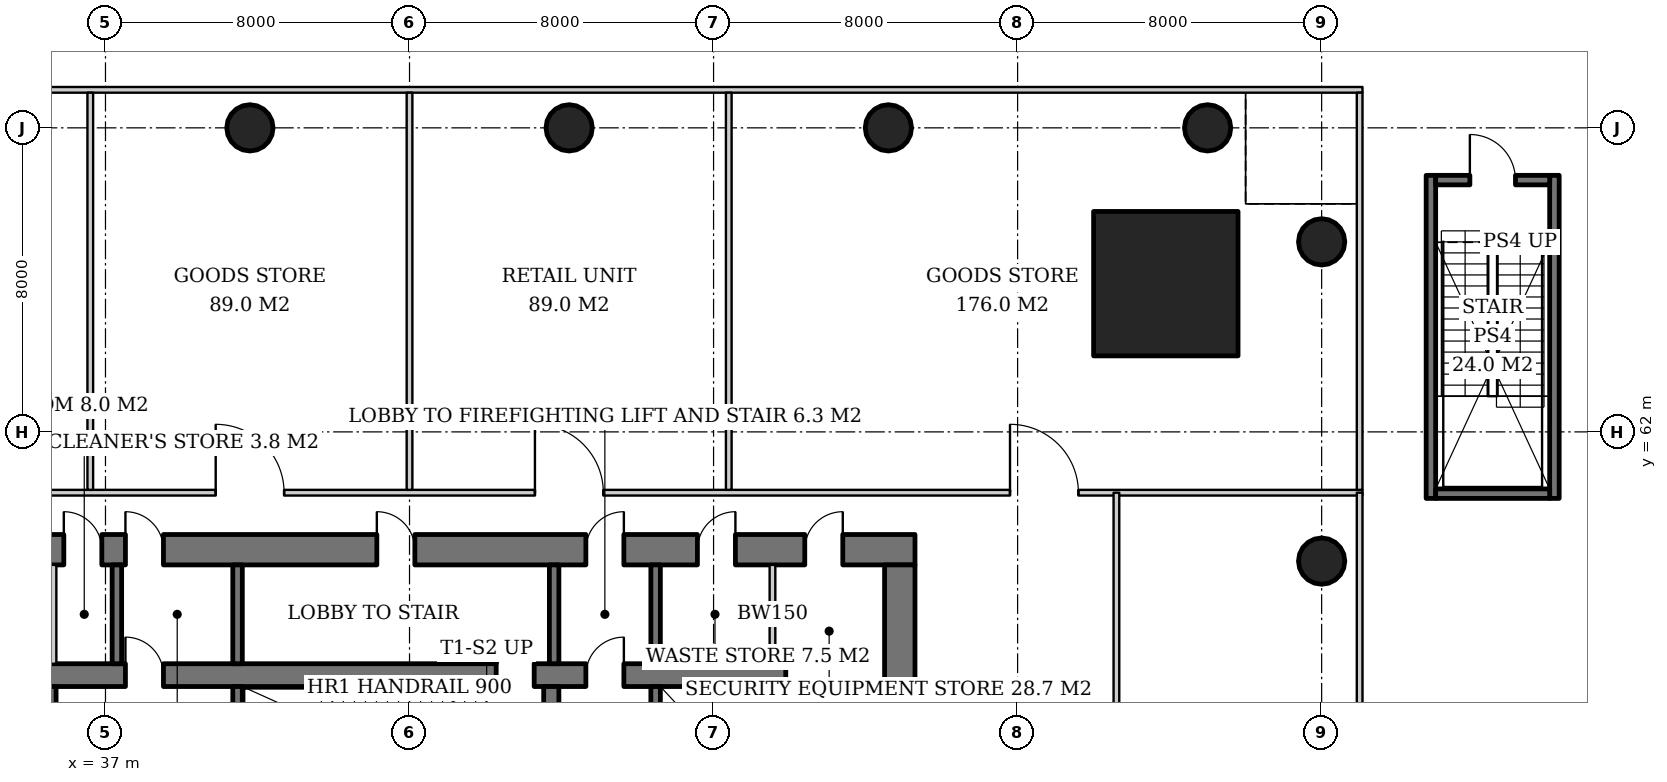
"""IFC4 building model, lengths in metres.
Left out: names, types, materials, properties, quantities, classifications, styles, units other than length and angle.
Written with IfcOpenShell. Run it as: python <this file> out.ifc"""

import sys

from ifc_helpers import new_model, si_unit, direction, frame, frame_2d, origin, origin_2d, place, context, subcontext, project, spatial, rectangle, hollow_circle, extrude, element, fill, save


model = new_model("IFC4")
c1 = context("Model", 3, precision=1e-05, world=origin(), true_north=direction((0.0, 1.0)))
c2 = subcontext(c1, "Body", "Model", "MODEL_VIEW")
j1 = project(units=[si_unit("LENGTHUNIT", "METRE"), si_unit("PLANEANGLEUNIT", "RADIAN")], contexts=[c1])
p1 = place(None, origin())
s1 = spatial("IfcSite", under=j1, at=p1, CompositionType="ELEMENT")
p2 = place(p1, origin())
s2 = spatial("IfcBuilding", under=s1, at=p2, CompositionType="ELEMENT")
p3 = place(p2, frame((0.0, 0.0, 6.0)))
s3 = spatial("IfcBuildingStorey", under=s2, at=p3, CompositionType="ELEMENT", Elevation=6.0)
p4 = place(p3, frame((64.9, 65.9, 0.0), z_axis=(0.0, 0.0, 1.0), x_axis=(1.0, 0.0, 0.0)))
e1 = element("IfcColumn", 1, at=p4, inside=s3, PredefinedType="COLUMN", context=c2, shape_type="SweptSolid", body=[
    extrude(rectangle(XDim=3.8, YDim=3.8, at=origin_2d()), origin(), (0.0, 0.0, 1.0), 5.0),
])
for number, where, z_axis, x_axis in (
    (2, (69.0, 67.0, 0.0), (0.0, 0.0, 1.0), (1.0, 0.0, 0.0)),
    (3, (69.0, 58.6, 0.0), (0.0, 0.0, 1.0), (1.0, 0.0, 0.0)),
    (4, (66.0, 70.0, 0.0), (0.0, 0.0, 1.0), (1.0, 0.0, 0.0)),
    (5, (57.6, 70.0, 0.0), (0.0, 0.0, 1.0), (1.0, 0.0, 0.0)),
    (6, (49.2, 70.0, 0.0), (0.0, 0.0, 1.0), (1.0, 0.0, 0.0)),
    (7, (40.8, 70.0, 0.0), (0.0, 0.0, 1.0), (1.0, 0.0, 0.0)),
):
    element("IfcColumn", number, at=place(p3, frame(where, z_axis=z_axis, x_axis=x_axis)), inside=s3, PredefinedType="COLUMN", context=c2, shape_type="SweptSolid", body=[
        extrude(hollow_circle(Radius=0.61, WallThickness=0.04, at=origin_2d()), origin(), (0.0, 0.0, 1.0), 5.0),
    ])
p5 = place(p3, frame((35.1, 55.6, 0.0), z_axis=(0.0, 0.0, 1.0), x_axis=(1.0, 0.0, 0.0)))
e8 = element("IfcWall", 8, at=p5, inside=s3, PredefinedType="SHEAR", context=c2, shape_type="SweptSolid", body=[
    extrude(rectangle(XDim=19.8, YDim=0.6, at=frame_2d((9.9, 0.0))), origin(), (0.0, 0.0, 1.0), 5.0),
])
p6 = place(p5, frame((14.54, 0.0, 0.0)))
e9 = element("IfcOpeningElement", 9, at=p6, cuts=e8, PredefinedType="OPENING", context=c2, shape_type="SweptSolid", body=[
    extrude(rectangle(XDim=1.0, YDim=2.1, at=frame_2d((0.5, 1.05))), frame((0.0, 0.31, 0.0), z_axis=(0.0, -1.0, 0.0), x_axis=(1.0, 0.0, 0.0)), (0.0, 0.0, 1.0), 0.62),
])
p7 = place(p5, frame((12.18, 0.0, 0.0)))
e10 = element("IfcOpeningElement", 10, at=p7, cuts=e8, PredefinedType="OPENING", context=c2, shape_type="SweptSolid", body=[
    extrude(rectangle(XDim=1.0, YDim=2.1, at=frame_2d((0.5, 1.05))), frame((0.0, 0.31, 0.0), z_axis=(0.0, -1.0, 0.0), x_axis=(1.0, 0.0, 0.0)), (0.0, 0.0, 1.0), 0.62),
])
p8 = place(p5, frame((2.425, 0.0, 0.0)))
e11 = element("IfcOpeningElement", 11, at=p8, cuts=e8, PredefinedType="OPENING", context=c2, shape_type="SweptSolid", body=[
    extrude(rectangle(XDim=1.0, YDim=2.1, at=frame_2d((0.5, 1.05))), frame((0.0, 0.31, 0.0), z_axis=(0.0, -1.0, 0.0), x_axis=(1.0, 0.0, 0.0)), (0.0, 0.0, 1.0), 0.62),
])
p9 = place(p3, frame((35.4, 36.7, 0.0), z_axis=(0.0, 0.0, 1.0), x_axis=(0.0, 1.0, 0.0)))
e12 = element("IfcWall", 12, at=p9, inside=s3, PredefinedType="SHEAR", context=c2, shape_type="SweptSolid", body=[
    extrude(rectangle(XDim=18.6, YDim=0.6, at=frame_2d((9.3, 0.0))), origin(), (0.0, 0.0, 1.0), 5.0),
])
p10 = place(p9, frame((8.4, 0.0, 0.0)))
e13 = element("IfcOpeningElement", 13, at=p10, cuts=e12, PredefinedType="OPENING", context=c2, shape_type="SweptSolid", body=[
    extrude(rectangle(XDim=1.8, YDim=2.4, at=frame_2d((0.9, 1.2))), frame((0.0, 0.31, 0.0), z_axis=(0.0, -1.0, 0.0), x_axis=(1.0, 0.0, 0.0)), (0.0, 0.0, 1.0), 0.62),
])
p11 = place(p3, frame((54.6, 36.7, 0.0), z_axis=(0.0, 0.0, 1.0), x_axis=(0.0, 1.0, 0.0)))
e14 = element("IfcWall", 14, at=p11, inside=s3, PredefinedType="SHEAR", context=c2, shape_type="SweptSolid", body=[
    extrude(rectangle(XDim=18.6, YDim=0.6, at=frame_2d((9.3, 0.0))), origin(), (0.0, 0.0, 1.0), 5.0),
])
p12 = place(p11, frame((8.4, 0.0, 0.0)))
e15 = element("IfcOpeningElement", 15, at=p12, cuts=e14, PredefinedType="OPENING", context=c2, shape_type="SweptSolid", body=[
    extrude(rectangle(XDim=1.8, YDim=2.4, at=frame_2d((0.9, 1.2))), frame((0.0, 0.31, 0.0), z_axis=(0.0, -1.0, 0.0), x_axis=(1.0, 0.0, 0.0)), (0.0, 0.0, 1.0), 0.62),
])
p13 = place(p3, frame((31.7, 58.9, 0.0), z_axis=(0.0, 0.0, 1.0), x_axis=(1.0, 0.0, 0.0)))
e16 = element("IfcWall", 16, at=p13, inside=s3, PredefinedType="SHEAR", context=c2, shape_type="SweptSolid", body=[
    extrude(rectangle(XDim=26.6, YDim=0.8, at=frame_2d((13.3, 0.0))), origin(), (0.0, 0.0, 1.0), 5.0),
])
p14 = place(p13, frame((17.94, 0.0, 0.0)))
e17 = element("IfcOpeningElement", 17, at=p14, cuts=e16, PredefinedType="OPENING", context=c2, shape_type="SweptSolid", body=[
    extrude(rectangle(XDim=1.0, YDim=2.1, at=frame_2d((0.5, 1.05))), frame((0.0, 0.41, 0.0), z_axis=(0.0, -1.0, 0.0), x_axis=(1.0, 0.0, 0.0)), (0.0, 0.0, 1.0), 0.82),
])
p15 = place(p13, frame((12.44, 0.0, 0.0)))
e18 = element("IfcOpeningElement", 18, at=p15, cuts=e16, PredefinedType="OPENING", context=c2, shape_type="SweptSolid", body=[
    extrude(rectangle(XDim=1.0, YDim=2.1, at=frame_2d((0.5, 1.05))), frame((0.0, 0.41, 0.0), z_axis=(0.0, -1.0, 0.0), x_axis=(1.0, 0.0, 0.0)), (0.0, 0.0, 1.0), 0.82),
])
p16 = place(p13, frame((5.825, 0.0, 0.0)))
e19 = element("IfcOpeningElement", 19, at=p16, cuts=e16, PredefinedType="OPENING", context=c2, shape_type="SweptSolid", body=[
    extrude(rectangle(XDim=1.0, YDim=2.1, at=frame_2d((0.5, 1.05))), frame((0.0, 0.41, 0.0), z_axis=(0.0, -1.0, 0.0), x_axis=(1.0, 0.0, 0.0)), (0.0, 0.0, 1.0), 0.82),
])
p17 = place(p13, frame((1.139, 0.0, 0.0)))
e20 = element("IfcOpeningElement", 20, at=p17, cuts=e16, PredefinedType="OPENING", context=c2, shape_type="SweptSolid", body=[
    extrude(rectangle(XDim=1.0, YDim=2.1, at=frame_2d((0.5, 1.05))), frame((0.0, 0.41, 0.0), z_axis=(0.0, -1.0, 0.0), x_axis=(1.0, 0.0, 0.0)), (0.0, 0.0, 1.0), 0.82),
])
p18 = place(p13, frame((2.661, 0.0, 0.0)))
e21 = element("IfcOpeningElement", 21, at=p18, cuts=e16, PredefinedType="OPENING", context=c2, shape_type="SweptSolid", body=[
    extrude(rectangle(XDim=1.0, YDim=2.1, at=frame_2d((0.5, 1.05))), frame((0.0, 0.41, 0.0), z_axis=(0.0, -1.0, 0.0), x_axis=(1.0, 0.0, 0.0)), (0.0, 0.0, 1.0), 0.82),
])
p19 = place(p13, frame((4.204, 0.0, 0.0)))
e22 = element("IfcOpeningElement", 22, at=p19, cuts=e16, PredefinedType="OPENING", context=c2, shape_type="SweptSolid", body=[
    extrude(rectangle(XDim=1.0, YDim=2.1, at=frame_2d((0.5, 1.05))), frame((0.0, 0.41, 0.0), z_axis=(0.0, -1.0, 0.0), x_axis=(1.0, 0.0, 0.0)), (0.0, 0.0, 1.0), 0.82),
])
p20 = place(p13, frame((20.875, 0.0, 0.0)))
e23 = element("IfcOpeningElement", 23, at=p20, cuts=e16, PredefinedType="OPENING", context=c2, shape_type="SweptSolid", body=[
    extrude(rectangle(XDim=1.0, YDim=2.1, at=frame_2d((0.5, 1.05))), frame((0.0, 0.41, 0.0), z_axis=(0.0, -1.0, 0.0), x_axis=(1.0, 0.0, 0.0)), (0.0, 0.0, 1.0), 0.82),
])
p21 = place(p13, frame((23.7, 0.0, 0.0)))
e24 = element("IfcOpeningElement", 24, at=p21, cuts=e16, PredefinedType="OPENING", context=c2, shape_type="SweptSolid", body=[
    extrude(rectangle(XDim=1.0, YDim=2.1, at=frame_2d((0.5, 1.05))), frame((0.0, 0.41, 0.0), z_axis=(0.0, -1.0, 0.0), x_axis=(1.0, 0.0, 0.0)), (0.0, 0.0, 1.0), 0.82),
])
p22 = place(p3, frame((57.9, 33.5, 0.0), z_axis=(0.0, 0.0, 1.0), x_axis=(0.0, 1.0, 0.0)))
e25 = element("IfcWall", 25, at=p22, inside=s3, PredefinedType="SHEAR", context=c2, shape_type="SweptSolid", body=[
    extrude(rectangle(XDim=25.0, YDim=0.8, at=frame_2d((12.5, 0.0))), origin(), (0.0, 0.0, 1.0), 5.0),
])
p23 = place(p22, frame((11.6, 0.0, 0.0)))
e26 = element("IfcOpeningElement", 26, at=p23, cuts=e25, PredefinedType="OPENING", context=c2, shape_type="SweptSolid", body=[
    extrude(rectangle(XDim=1.8, YDim=2.4, at=frame_2d((0.9, 1.2))), frame((0.0, 0.41, 0.0), z_axis=(0.0, -1.0, 0.0), x_axis=(1.0, 0.0, 0.0)), (0.0, 0.0, 1.0), 0.82),
])
p24 = place(p3, frame((48.73, 52.4, 0.0), z_axis=(0.0, 0.0, 1.0), x_axis=(0.0, 1.0, 0.0)))
e27 = element("IfcWall", 27, at=p24, inside=s3, PredefinedType="SHEAR", context=c2, shape_type="SweptSolid", body=[
    extrude(rectangle(XDim=2.9, YDim=0.4, at=frame_2d((1.45, 0.0))), origin(), (0.0, 0.0, 1.0), 5.0),
])
p25 = place(p3, frame((40.475, 52.4, 0.0), z_axis=(0.0, 0.0, 1.0), x_axis=(0.0, 1.0, 0.0)))
e28 = element("IfcWall", 28, at=p25, inside=s3, PredefinedType="SHEAR", context=c2, shape_type="SweptSolid", body=[
    extrude(rectangle(XDim=2.9, YDim=0.25, at=frame_2d((1.45, 0.0))), origin(), (0.0, 0.0, 1.0), 5.0),
])
p26 = place(p3, frame((51.475, 52.4, 0.0), z_axis=(0.0, 0.0, 1.0), x_axis=(0.0, 1.0, 0.0)))
e29 = element("IfcWall", 29, at=p26, inside=s3, PredefinedType="SHEAR", context=c2, shape_type="SweptSolid", body=[
    extrude(rectangle(XDim=2.9, YDim=0.25, at=frame_2d((1.45, 0.0))), origin(), (0.0, 0.0, 1.0), 5.0),
])
p27 = place(p26, frame((0.8, 0.0, 0.0)))
e30 = element("IfcOpeningElement", 30, at=p27, cuts=e29, PredefinedType="OPENING", context=c2, shape_type="SweptSolid", body=[
    extrude(rectangle(XDim=1.3, YDim=2.2, at=frame_2d((0.65, 1.1))), frame((0.0, 0.135, 0.0), z_axis=(0.0, -1.0, 0.0), x_axis=(1.0, 0.0, 0.0)), (0.0, 0.0, 1.0), 0.27),
])
for number, where, z_axis, x_axis in (
    (31, (48.805, 55.9, 0.0), (0.0, 0.0, 1.0), (0.0, 1.0, 0.0)),
    (32, (51.475, 55.9, 0.0), (0.0, 0.0, 1.0), (0.0, 1.0, 0.0)),
    (33, (40.475, 55.9, 0.0), (0.0, 0.0, 1.0), (0.0, 1.0, 0.0)),
    (34, (37.3, 55.9, 0.0), (0.0, 0.0, 1.0), (0.0, 1.0, 0.0)),
):
    element("IfcWall", number, at=place(p3, frame(where, z_axis=z_axis, x_axis=x_axis)), inside=s3, PredefinedType="SOLIDWALL", context=c2, shape_type="SweptSolid", body=[
        extrude(rectangle(XDim=2.6, YDim=0.25, at=frame_2d((1.3, 0.0))), origin(), (0.0, 0.0, 1.0), 4.7),
    ])
for number, where, z_axis, x_axis in (
    (35, (35.632, 55.9, 0.0), (0.0, 0.0, 1.0), (0.0, 1.0, 0.0)),
    (36, (54.55, 55.9, 0.0), (0.0, 0.0, 1.0), (0.0, 1.0, 0.0)),
):
    element("IfcWall", number, at=place(p3, frame(where, z_axis=z_axis, x_axis=x_axis)), inside=s3, PredefinedType="SOLIDWALL", context=c2, shape_type="SweptSolid", body=[
        extrude(rectangle(XDim=2.6, YDim=0.15, at=frame_2d((1.3, 0.0))), origin(), (0.0, 0.0, 1.0), 4.7),
    ])
for number, where, z_axis, x_axis in (
    (37, (71.875, 60.25, 0.0), (0.0, 0.0, 1.0), (0.0, 1.0, 0.0)),
    (38, (75.125, 60.25, 0.0), (0.0, 0.0, 1.0), (0.0, 1.0, 0.0)),
):
    element("IfcWall", number, at=place(p3, frame(where, z_axis=z_axis, x_axis=x_axis)), inside=s3, PredefinedType="SOLIDWALL", context=c2, shape_type="SweptSolid", body=[
        extrude(rectangle(XDim=8.5, YDim=0.25, at=frame_2d((4.25, 0.0))), origin(), (0.0, 0.0, 1.0), 4.7),
    ])
p28 = place(p3, frame((72.0, 60.375, 0.0), z_axis=(0.0, 0.0, 1.0), x_axis=(1.0, 0.0, 0.0)))
e39 = element("IfcWall", 39, at=p28, inside=s3, PredefinedType="SOLIDWALL", context=c2, shape_type="SweptSolid", body=[
    extrude(rectangle(XDim=3.0, YDim=0.25, at=frame_2d((1.5, 0.0))), origin(), (0.0, 0.0, 1.0), 4.7),
])
p29 = place(p3, frame((72.0, 68.625, 0.0), z_axis=(0.0, 0.0, 1.0), x_axis=(1.0, 0.0, 0.0)))
e40 = element("IfcWall", 40, at=p29, inside=s3, PredefinedType="SOLIDWALL", context=c2, shape_type="SweptSolid", body=[
    extrude(rectangle(XDim=3.0, YDim=0.25, at=frame_2d((1.5, 0.0))), origin(), (0.0, 0.0, 1.0), 4.7),
])
p30 = place(p29, frame((0.9, 0.0, 0.0)))
e41 = element("IfcOpeningElement", 41, at=p30, cuts=e40, PredefinedType="OPENING", context=c2, shape_type="SweptSolid", body=[
    extrude(rectangle(XDim=1.2, YDim=2.1, at=frame_2d((0.6, 1.05))), frame((0.0, 0.135, 0.0), z_axis=(0.0, -1.0, 0.0), x_axis=(1.0, 0.0, 0.0)), (0.0, 0.0, 1.0), 0.27),
])
p31 = place(p3, frame((19.925, 60.4, 0.0), z_axis=(0.0, 0.0, 1.0), x_axis=(1.0, 0.0, 0.0)))
e42 = element("IfcWall", 42, at=p31, inside=s3, PredefinedType="PARTITIONING", context=c2, shape_type="SweptSolid", body=[
    extrude(rectangle(XDim=50.15, YDim=0.15, at=frame_2d((25.075, 0.0))), origin(), (0.0, 0.0, 1.0), 3.688),
])
p32 = place(p31, frame((7.475, 0.0, 0.0)))
e43 = element("IfcOpeningElement", 43, at=p32, cuts=e42, PredefinedType="OPENING", context=c2, shape_type="SweptSolid", body=[
    extrude(rectangle(XDim=1.8, YDim=2.4, at=frame_2d((0.9, 1.2))), frame((0.0, 0.085, 0.0), z_axis=(0.0, -1.0, 0.0), x_axis=(1.0, 0.0, 0.0)), (0.0, 0.0, 1.0), 0.17),
])
p33 = place(p31, frame((19.975, 0.0, 0.0)))
e44 = element("IfcOpeningElement", 44, at=p33, cuts=e42, PredefinedType="OPENING", context=c2, shape_type="SweptSolid", body=[
    extrude(rectangle(XDim=1.8, YDim=2.4, at=frame_2d((0.9, 1.2))), frame((0.0, 0.085, 0.0), z_axis=(0.0, -1.0, 0.0), x_axis=(1.0, 0.0, 0.0)), (0.0, 0.0, 1.0), 0.17),
])
p34 = place(p31, frame((28.375, 0.0, 0.0)))
e45 = element("IfcOpeningElement", 45, at=p34, cuts=e42, PredefinedType="OPENING", context=c2, shape_type="SweptSolid", body=[
    extrude(rectangle(XDim=1.8, YDim=2.4, at=frame_2d((0.9, 1.2))), frame((0.0, 0.085, 0.0), z_axis=(0.0, -1.0, 0.0), x_axis=(1.0, 0.0, 0.0)), (0.0, 0.0, 1.0), 0.17),
])
p35 = place(p31, frame((40.875, 0.0, 0.0)))
e46 = element("IfcOpeningElement", 46, at=p35, cuts=e42, PredefinedType="OPENING", context=c2, shape_type="SweptSolid", body=[
    extrude(rectangle(XDim=1.8, YDim=2.4, at=frame_2d((0.9, 1.2))), frame((0.0, 0.085, 0.0), z_axis=(0.0, -1.0, 0.0), x_axis=(1.0, 0.0, 0.0)), (0.0, 0.0, 1.0), 0.17),
])
p36 = place(p3, frame((19.925, 71.0, 0.0), z_axis=(0.0, 0.0, 1.0), x_axis=(1.0, 0.0, 0.0)))
e47 = element("IfcWall", 47, at=p36, inside=s3, PredefinedType="PARTITIONING", context=c2, shape_type="SweptSolid", body=[
    extrude(rectangle(XDim=50.15, YDim=0.15, at=frame_2d((25.075, 0.0))), origin(), (0.0, 0.0, 1.0), 4.7),
])
p37 = place(p3, frame((70.0, 60.475, 0.0), z_axis=(0.0, 0.0, 1.0), x_axis=(0.0, 1.0, 0.0)))
e48 = element("IfcWall", 48, at=p37, inside=s3, PredefinedType="PARTITIONING", context=c2, shape_type="SweptSolid", body=[
    extrude(rectangle(XDim=10.45, YDim=0.15, at=frame_2d((5.225, 0.0))), origin(), (0.0, 0.0, 1.0), 4.7),
])
for number, where, z_axis, x_axis in (
    (49, (36.6, 60.475, 0.0), (0.0, 0.0, 1.0), (0.0, 1.0, 0.0)),
    (50, (45.0, 60.475, 0.0), (0.0, 0.0, 1.0), (0.0, 1.0, 0.0)),
    (51, (53.4, 60.475, 0.0), (0.0, 0.0, 1.0), (0.0, 1.0, 0.0)),
):
    element("IfcWall", number, at=place(p3, frame(where, z_axis=z_axis, x_axis=x_axis)), inside=s3, PredefinedType="PARTITIONING", context=c2, shape_type="SweptSolid", body=[
        extrude(rectangle(XDim=10.45, YDim=0.15, at=frame_2d((5.225, 0.0))), origin(), (0.0, 0.0, 1.0), 4.08),
    ])
p38 = place(p3, frame((63.6, 31.6, 0.0), z_axis=(0.0, 0.0, 1.0), x_axis=(0.0, 1.0, 0.0)))
e52 = element("IfcWall", 52, at=p38, inside=s3, PredefinedType="PARTITIONING", context=c2, shape_type="SweptSolid", body=[
    extrude(rectangle(XDim=28.8, YDim=0.15, at=frame_2d((14.4, 0.0))), origin(), (0.0, 0.0, 1.0), 3.688),
])
p39 = place(p38, frame((6.3, 0.0, 0.0)))
e53 = element("IfcOpeningElement", 53, at=p39, cuts=e52, PredefinedType="OPENING", context=c2, shape_type="SweptSolid", body=[
    extrude(rectangle(XDim=1.8, YDim=2.4, at=frame_2d((0.9, 1.2))), frame((0.0, 0.085, 0.0), z_axis=(0.0, -1.0, 0.0), x_axis=(1.0, 0.0, 0.0)), (0.0, 0.0, 1.0), 0.17),
])
p40 = place(p38, frame((20.7, 0.0, 0.0)))
e54 = element("IfcOpeningElement", 54, at=p40, cuts=e52, PredefinedType="OPENING", context=c2, shape_type="SweptSolid", body=[
    extrude(rectangle(XDim=1.8, YDim=2.4, at=frame_2d((0.9, 1.2))), frame((0.0, 0.085, 0.0), z_axis=(0.0, -1.0, 0.0), x_axis=(1.0, 0.0, 0.0)), (0.0, 0.0, 1.0), 0.17),
])
p41 = place(p3, frame((70.0, 31.6, 0.0), z_axis=(0.0, 0.0, 1.0), x_axis=(0.0, 1.0, 0.0)))
e55 = element("IfcWall", 55, at=p41, inside=s3, PredefinedType="PARTITIONING", context=c2, shape_type="SweptSolid", body=[
    extrude(rectangle(XDim=28.8, YDim=0.15, at=frame_2d((14.4, 0.0))), origin(), (0.0, 0.0, 1.0), 4.7),
])
p42 = place(p6, origin())
e56 = element("IfcDoor", 56, at=p42, inside=s3, OperationType="SINGLE_SWING_RIGHT", PredefinedType="DOOR", context=c2, shape_type="SweptSolid", body=[
    extrude(rectangle(XDim=1.0, YDim=2.1, at=frame_2d((0.5, 1.05))), frame((0.0, 0.025, 0.0), z_axis=(0.0, -1.0, 0.0), x_axis=(1.0, 0.0, 0.0)), (0.0, 0.0, 1.0), 0.05),
])
fill(e9, e56)
p43 = place(p7, origin())
e57 = element("IfcDoor", 57, at=p43, inside=s3, OperationType="SINGLE_SWING_RIGHT", PredefinedType="DOOR", context=c2, shape_type="SweptSolid", body=[
    extrude(rectangle(XDim=1.0, YDim=2.1, at=frame_2d((0.5, 1.05))), frame((0.0, 0.025, 0.0), z_axis=(0.0, -1.0, 0.0), x_axis=(1.0, 0.0, 0.0)), (0.0, 0.0, 1.0), 0.05),
])
fill(e10, e57)
p44 = place(p14, origin())
e58 = element("IfcDoor", 58, at=p44, inside=s3, OperationType="SINGLE_SWING_RIGHT", PredefinedType="DOOR", context=c2, shape_type="SweptSolid", body=[
    extrude(rectangle(XDim=1.0, YDim=2.1, at=frame_2d((0.5, 1.05))), frame((0.0, 0.025, 0.0), z_axis=(0.0, -1.0, 0.0), x_axis=(1.0, 0.0, 0.0)), (0.0, 0.0, 1.0), 0.05),
])
fill(e17, e58)
p45 = place(p15, origin())
e59 = element("IfcDoor", 59, at=p45, inside=s3, OperationType="SINGLE_SWING_LEFT", PredefinedType="DOOR", context=c2, shape_type="SweptSolid", body=[
    extrude(rectangle(XDim=1.0, YDim=2.1, at=frame_2d((0.5, 1.05))), frame((0.0, 0.025, 0.0), z_axis=(0.0, -1.0, 0.0), x_axis=(1.0, 0.0, 0.0)), (0.0, 0.0, 1.0), 0.05),
])
fill(e18, e59)
p46 = place(p16, origin())
e60 = element("IfcDoor", 60, at=p46, inside=s3, OperationType="SINGLE_SWING_LEFT", PredefinedType="DOOR", context=c2, shape_type="SweptSolid", body=[
    extrude(rectangle(XDim=1.0, YDim=2.1, at=frame_2d((0.5, 1.05))), frame((0.0, 0.025, 0.0), z_axis=(0.0, -1.0, 0.0), x_axis=(1.0, 0.0, 0.0)), (0.0, 0.0, 1.0), 0.05),
])
fill(e19, e60)
p47 = place(p8, origin())
e61 = element("IfcDoor", 61, at=p47, inside=s3, OperationType="SINGLE_SWING_LEFT", PredefinedType="DOOR", context=c2, shape_type="SweptSolid", body=[
    extrude(rectangle(XDim=1.0, YDim=2.1, at=frame_2d((0.5, 1.05))), frame((0.0, -0.24, 0.0), z_axis=(0.0, -1.0, 0.0), x_axis=(1.0, 0.0, 0.0)), (0.0, 0.0, 1.0), 0.05),
])
fill(e11, e61)
p48 = place(p19, origin())
e62 = element("IfcDoor", 62, at=p48, inside=s3, OperationType="SINGLE_SWING_LEFT", PredefinedType="DOOR", context=c2, shape_type="SweptSolid", body=[
    extrude(rectangle(XDim=1.0, YDim=2.1, at=frame_2d((0.5, 1.05))), frame((0.0, -0.34, 0.0), z_axis=(0.0, -1.0, 0.0), x_axis=(1.0, 0.0, 0.0)), (0.0, 0.0, 1.0), 0.05),
])
fill(e22, e62)
p49 = place(p20, origin())
e63 = element("IfcDoor", 63, at=p49, inside=s3, OperationType="SINGLE_SWING_RIGHT", PredefinedType="DOOR", context=c2, shape_type="SweptSolid", body=[
    extrude(rectangle(XDim=1.0, YDim=2.1, at=frame_2d((0.5, 1.05))), frame((0.0, -0.34, 0.0), z_axis=(0.0, -1.0, 0.0), x_axis=(1.0, 0.0, 0.0)), (0.0, 0.0, 1.0), 0.05),
])
fill(e23, e63)
p50 = place(p21, origin())
e64 = element("IfcDoor", 64, at=p50, inside=s3, OperationType="SINGLE_SWING_RIGHT", PredefinedType="DOOR", context=c2, shape_type="SweptSolid", body=[
    extrude(rectangle(XDim=1.0, YDim=2.1, at=frame_2d((0.5, 1.05))), frame((0.0, -0.34, 0.0), z_axis=(0.0, -1.0, 0.0), x_axis=(1.0, 0.0, 0.0)), (0.0, 0.0, 1.0), 0.05),
])
fill(e24, e64)
p51 = place(p30, origin())
e65 = element("IfcDoor", 65, at=p51, inside=s3, OperationType="SINGLE_SWING_LEFT", PredefinedType="DOOR", context=c2, shape_type="SweptSolid", body=[
    extrude(rectangle(XDim=1.2, YDim=2.1, at=frame_2d((0.6, 1.05))), frame((0.0, 0.025, 0.0), z_axis=(0.0, -1.0, 0.0), x_axis=(1.0, 0.0, 0.0)), (0.0, 0.0, 1.0), 0.05),
])
fill(e41, e65)
p52 = place(p33, origin())
e66 = element("IfcDoor", 66, at=p52, inside=s3, OperationType="DOUBLE_DOOR_SINGLE_SWING", PredefinedType="DOOR", context=c2, shape_type="SweptSolid", body=[
    extrude(rectangle(XDim=1.8, YDim=2.4, at=frame_2d((0.9, 1.2))), frame((0.0, 0.025, 0.0), z_axis=(0.0, -1.0, 0.0), x_axis=(1.0, 0.0, 0.0)), (0.0, 0.0, 1.0), 0.05),
])
fill(e44, e66)
p53 = place(p34, origin())
e67 = element("IfcDoor", 67, at=p53, inside=s3, OperationType="DOUBLE_DOOR_SINGLE_SWING", PredefinedType="DOOR", context=c2, shape_type="SweptSolid", body=[
    extrude(rectangle(XDim=1.8, YDim=2.4, at=frame_2d((0.9, 1.2))), frame((0.0, 0.025, 0.0), z_axis=(0.0, -1.0, 0.0), x_axis=(1.0, 0.0, 0.0)), (0.0, 0.0, 1.0), 0.05),
])
fill(e45, e67)
p54 = place(p35, origin())
e68 = element("IfcDoor", 68, at=p54, inside=s3, OperationType="DOUBLE_DOOR_SINGLE_SWING", PredefinedType="DOOR", context=c2, shape_type="SweptSolid", body=[
    extrude(rectangle(XDim=1.8, YDim=2.4, at=frame_2d((0.9, 1.2))), frame((0.0, 0.025, 0.0), z_axis=(0.0, -1.0, 0.0), x_axis=(1.0, 0.0, 0.0)), (0.0, 0.0, 1.0), 0.05),
])
fill(e46, e68)
save(model, sys.argv[1])
